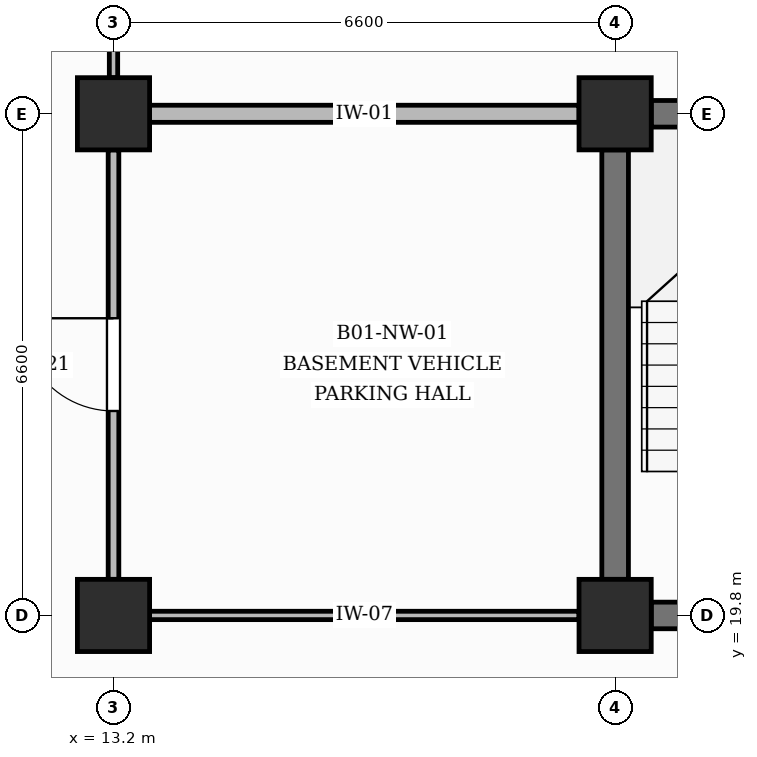
"""IFC4 building model, lengths in metres.
Left out: names, types, materials, properties, quantities, classifications, styles, units other than length and angle.
Written with IfcOpenShell. Run it as: python <this file> out.ifc"""

import sys

from ifc_helpers import new_model, si_unit, direction, frame, frame_2d, origin, origin_2d, place, context, subcontext, project, spatial, rectangle, extrude, element, fill, save


model = new_model("IFC4")
c1 = context("Model", 3, precision=1e-05, world=origin(), true_north=direction((0.0, 1.0)))
c2 = subcontext(c1, "Body", "Model", "MODEL_VIEW")
j1 = project(units=[si_unit("LENGTHUNIT", "METRE"), si_unit("PLANEANGLEUNIT", "RADIAN")], contexts=[c1])
p1 = place(None, origin())
s1 = spatial("IfcSite", under=j1, at=p1, CompositionType="ELEMENT")
p2 = place(p1, origin())
s2 = spatial("IfcBuilding", under=s1, at=p2, CompositionType="ELEMENT")
p3 = place(p2, frame((0.0, 0.0, -4.5)))
s3 = spatial("IfcBuildingStorey", under=s2, at=p3, CompositionType="ELEMENT", Elevation=-4.5)
for number, where, z_axis, x_axis in (
    (1, (13.2, 19.8, 0.0), (0.0, 0.0, 1.0), (1.0, 0.0, 0.0)),
    (2, (13.2, 26.4, 0.0), (0.0, 0.0, 1.0), (1.0, 0.0, 0.0)),
    (3, (19.8, 19.8, 0.0), (0.0, 0.0, 1.0), (1.0, 0.0, 0.0)),
    (4, (19.8, 26.4, 0.0), (0.0, 0.0, 1.0), (1.0, 0.0, 0.0)),
):
    element("IfcColumn", number, at=place(p3, frame(where, z_axis=z_axis, x_axis=x_axis)), inside=s3, PredefinedType="COLUMN", context=c2, shape_type="SweptSolid", body=[
        extrude(rectangle(XDim=0.95, YDim=0.95, at=origin_2d()), origin(), (0.0, 0.0, 1.0), 4.5),
    ])
p4 = place(p3, frame((20.275, 19.8, 0.0), z_axis=(0.0, 0.0, 1.0), x_axis=(1.0, 0.0, 0.0)))
e5 = element("IfcWall", 5, at=p4, inside=s3, PredefinedType="SHEAR", context=c2, shape_type="SweptSolid", body=[
    extrude(rectangle(XDim=5.65, YDim=0.35, at=frame_2d((2.825, 0.0))), origin(), (0.0, 0.0, 1.0), 3.24),
])
p5 = place(p4, frame((2.275, 0.0, 0.0)))
e6 = element("IfcOpeningElement", 6, at=p5, cuts=e5, PredefinedType="OPENING", context=c2, shape_type="SweptSolid", body=[
    extrude(rectangle(XDim=1.1, YDim=2.15, at=frame_2d((0.55, 1.075))), frame((0.0, 0.185, 0.0), z_axis=(0.0, -1.0, 0.0), x_axis=(1.0, 0.0, 0.0)), (0.0, 0.0, 1.0), 0.37),
])
p6 = place(p3, frame((20.275, 26.4, 0.0), z_axis=(0.0, 0.0, 1.0), x_axis=(1.0, 0.0, 0.0)))
e7 = element("IfcWall", 7, at=p6, inside=s3, PredefinedType="SHEAR", context=c2, shape_type="SweptSolid", body=[
    extrude(rectangle(XDim=5.675, YDim=0.35, at=frame_2d((2.837, 0.0))), origin(), (0.0, 0.0, 1.0), 3.34),
])
p7 = place(p3, frame((19.8, 20.275, 0.0), z_axis=(0.0, 0.0, 1.0), x_axis=(0.0, 1.0, 0.0)))
e8 = element("IfcWall", 8, at=p7, inside=s3, PredefinedType="SHEAR", context=c2, shape_type="SweptSolid", body=[
    extrude(rectangle(XDim=5.65, YDim=0.35, at=frame_2d((2.825, 0.0))), origin(), (0.0, 0.0, 1.0), 3.34),
])
p8 = place(p3, frame((13.2, 20.275, 0.0), z_axis=(0.0, 0.0, 1.0), x_axis=(0.0, 1.0, 0.0)))
e9 = element("IfcWall", 9, at=p8, inside=s3, PredefinedType="PARTITIONING", context=c2, shape_type="SweptSolid", body=[
    extrude(rectangle(XDim=5.65, YDim=0.14, at=frame_2d((2.825, 0.0))), origin(), (0.0, 0.0, 1.0), 3.34),
])
p9 = place(p8, frame((2.215, 0.0, 0.0)))
e10 = element("IfcOpeningElement", 10, at=p9, cuts=e9, PredefinedType="OPENING", context=c2, shape_type="SweptSolid", body=[
    extrude(rectangle(XDim=1.22, YDim=2.15, at=frame_2d((0.61, 1.075))), frame((0.0, 0.08, 0.0), z_axis=(0.0, -1.0, 0.0), x_axis=(1.0, 0.0, 0.0)), (0.0, 0.0, 1.0), 0.16),
])
p10 = place(p3, frame((13.2, 26.875, 0.0), z_axis=(0.0, 0.0, 1.0), x_axis=(0.0, 1.0, 0.0)))
e11 = element("IfcWall", 11, at=p10, inside=s3, PredefinedType="PARTITIONING", context=c2, shape_type="SweptSolid", body=[
    extrude(rectangle(XDim=5.65, YDim=0.11, at=frame_2d((2.825, 0.0))), origin(), (0.0, 0.0, 1.0), 3.34),
])
p11 = place(p10, frame((2.115, 0.0, 0.0)))
e12 = element("IfcOpeningElement", 12, at=p11, cuts=e11, PredefinedType="OPENING", context=c2, shape_type="SweptSolid", body=[
    extrude(rectangle(XDim=1.42, YDim=2.2, at=frame_2d((0.71, 1.1))), frame((0.0, 0.065, 0.0), z_axis=(0.0, -1.0, 0.0), x_axis=(1.0, 0.0, 0.0)), (0.0, 0.0, 1.0), 0.13),
])
p12 = place(p3, frame((13.675, 19.8, 0.0), z_axis=(0.0, 0.0, 1.0), x_axis=(1.0, 0.0, 0.0)))
e13 = element("IfcWall", 13, at=p12, inside=s3, PredefinedType="PARTITIONING", context=c2, shape_type="SweptSolid", body=[
    extrude(rectangle(XDim=5.65, YDim=0.11, at=frame_2d((2.825, 0.0))), origin(), (0.0, 0.0, 1.0), 3.34),
])
p13 = place(p3, frame((13.675, 26.4, 0.0), z_axis=(0.0, 0.0, 1.0), x_axis=(1.0, 0.0, 0.0)))
e14 = element("IfcWall", 14, at=p13, inside=s3, PredefinedType="PARTITIONING", context=c2, shape_type="SweptSolid", body=[
    extrude(rectangle(XDim=5.65, YDim=0.225, at=frame_2d((2.825, 0.0))), origin(), (0.0, 0.0, 1.0), 3.24),
])
p14 = place(p9, origin())
e15 = element("IfcDoor", 15, at=p14, inside=s3, OperationType="SINGLE_SWING_RIGHT", PredefinedType="DOOR", context=c2, shape_type="SweptSolid", body=[
    extrude(rectangle(XDim=1.22, YDim=2.15, at=frame_2d((0.61, 1.075))), frame((0.0, 0.025, 0.0), z_axis=(0.0, -1.0, 0.0), x_axis=(1.0, 0.0, 0.0)), (0.0, 0.0, 1.0), 0.05),
])
fill(e10, e15)
save(model, sys.argv[1])
